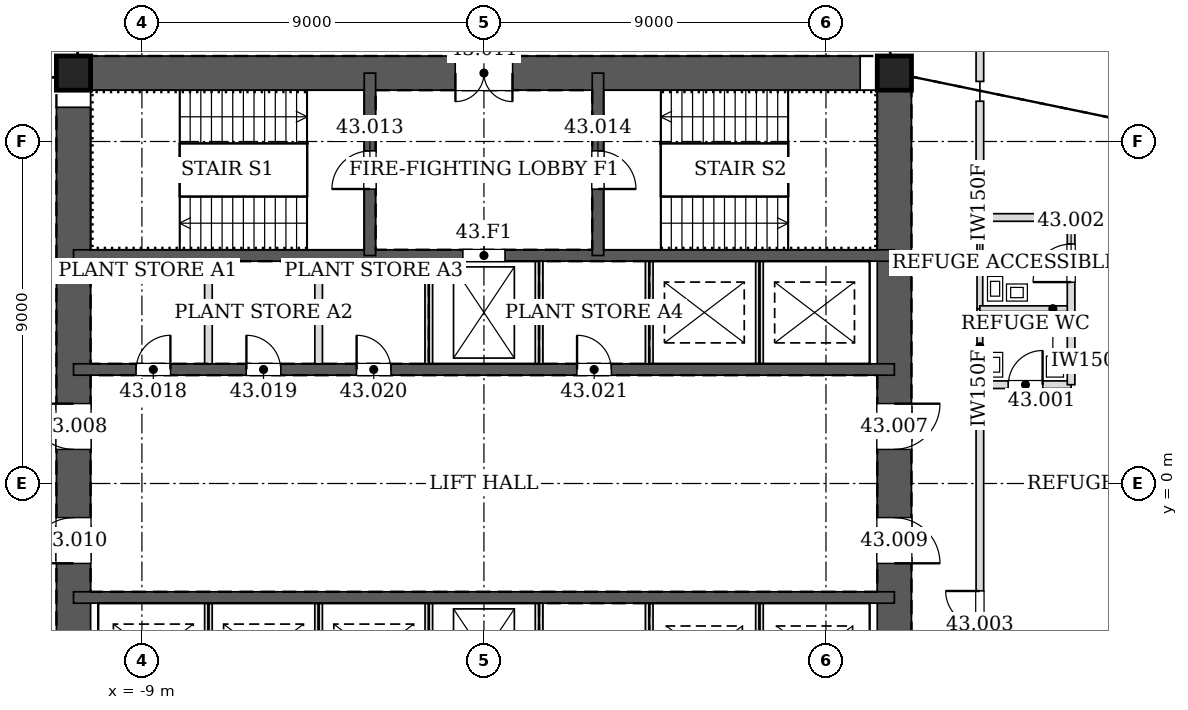
"""IFC4 building model, lengths in metres.
Left out: names, types, materials, properties, quantities, classifications, styles, units other than length and angle.
Written with IfcOpenShell. Run it as: python <this file> out.ifc"""

import sys

from ifc_helpers import new_model, si_unit, direction, frame, frame_2d, origin, origin_2d, place, context, subcontext, project, spatial, rectangle, hollow_rectangle, extrude, element, fill, save


model = new_model("IFC4")
c1 = context("Model", 3, precision=1e-05, world=origin(), true_north=direction((0.0, 1.0)))
c2 = subcontext(c1, "Body", "Model", "MODEL_VIEW")
j1 = project(units=[si_unit("LENGTHUNIT", "METRE"), si_unit("PLANEANGLEUNIT", "RADIAN")], contexts=[c1])
p1 = place(None, origin())
s1 = spatial("IfcSite", under=j1, at=p1, CompositionType="ELEMENT")
p2 = place(p1, origin())
s2 = spatial("IfcBuilding", under=s1, at=p2, CompositionType="ELEMENT")
p3 = place(p2, frame((0.0, 0.0, 189.0)))
s3 = spatial("IfcBuildingStorey", under=s2, at=p3, CompositionType="ELEMENT", Elevation=189.0)
for number, where, z_axis, x_axis in (
    (1, (10.8, 10.8, 0.0), (0.0, 0.0, 1.0), (1.0, 0.0, 0.0)),
    (2, (-10.8, 10.8, 0.0), (0.0, 0.0, 1.0), (1.0, 0.0, 0.0)),
):
    element("IfcColumn", number, at=place(p3, frame(where, z_axis=z_axis, x_axis=x_axis)), inside=s3, PredefinedType="COLUMN", context=c2, shape_type="SweptSolid", body=[
        extrude(hollow_rectangle(XDim=0.9, YDim=0.9, WallThickness=0.06, at=origin_2d()), origin(), (0.0, 0.0, 1.0), 4.5),
    ])
p4 = place(p3, frame((10.8, -10.8, 0.0), z_axis=(0.0, 0.0, 1.0), x_axis=(0.0, 1.0, 0.0)))
e3 = element("IfcWall", 3, at=p4, inside=s3, PredefinedType="SOLIDWALL", context=c2, shape_type="SweptSolid", body=[
    extrude(rectangle(XDim=21.6, YDim=0.9, at=frame_2d((10.8, 0.0))), origin(), (0.0, 0.0, 1.0), 4.5),
])
p5 = place(p4, frame((11.7, 0.0, 0.0)))
e4 = element("IfcOpeningElement", 4, at=p5, cuts=e3, PredefinedType="OPENING", context=c2, shape_type="SweptSolid", body=[
    extrude(rectangle(XDim=1.2, YDim=2.1, at=frame_2d((0.6, 1.05))), frame((0.0, 0.46, 0.0), z_axis=(0.0, -1.0, 0.0), x_axis=(1.0, 0.0, 0.0)), (0.0, 0.0, 1.0), 0.92),
])
p6 = place(p4, frame((8.7, 0.0, 0.0)))
e5 = element("IfcOpeningElement", 5, at=p6, cuts=e3, PredefinedType="OPENING", context=c2, shape_type="SweptSolid", body=[
    extrude(rectangle(XDim=1.2, YDim=2.1, at=frame_2d((0.6, 1.05))), frame((0.0, 0.46, 0.0), z_axis=(0.0, -1.0, 0.0), x_axis=(1.0, 0.0, 0.0)), (0.0, 0.0, 1.0), 0.92),
])
p7 = place(p3, frame((10.8, 10.8, 0.0), z_axis=(0.0, 0.0, 1.0), x_axis=(-1.0, 0.0, 0.0)))
e6 = element("IfcWall", 6, at=p7, inside=s3, PredefinedType="SOLIDWALL", context=c2, shape_type="SweptSolid", body=[
    extrude(rectangle(XDim=21.6, YDim=0.9, at=frame_2d((10.8, 0.0))), origin(), (0.0, 0.0, 1.0), 4.5),
])
p8 = place(p7, frame((10.05, 0.0, 0.0)))
e7 = element("IfcOpeningElement", 7, at=p8, cuts=e6, PredefinedType="OPENING", context=c2, shape_type="SweptSolid", body=[
    extrude(rectangle(XDim=1.5, YDim=2.1, at=frame_2d((0.75, 1.05))), frame((0.0, 0.46, 0.0), z_axis=(0.0, -1.0, 0.0), x_axis=(1.0, 0.0, 0.0)), (0.0, 0.0, 1.0), 0.92),
])
p9 = place(p3, frame((-10.8, 10.8, 0.0), z_axis=(0.0, 0.0, 1.0), x_axis=(0.0, -1.0, 0.0)))
e8 = element("IfcWall", 8, at=p9, inside=s3, PredefinedType="SOLIDWALL", context=c2, shape_type="SweptSolid", body=[
    extrude(rectangle(XDim=21.6, YDim=0.9, at=frame_2d((10.8, 0.0))), origin(), (0.0, 0.0, 1.0), 4.5),
])
p10 = place(p9, frame((8.7, 0.0, 0.0)))
e9 = element("IfcOpeningElement", 9, at=p10, cuts=e8, PredefinedType="OPENING", context=c2, shape_type="SweptSolid", body=[
    extrude(rectangle(XDim=1.2, YDim=2.1, at=frame_2d((0.6, 1.05))), frame((0.0, 0.46, 0.0), z_axis=(0.0, -1.0, 0.0), x_axis=(1.0, 0.0, 0.0)), (0.0, 0.0, 1.0), 0.92),
])
p11 = place(p9, frame((11.7, 0.0, 0.0)))
e10 = element("IfcOpeningElement", 10, at=p11, cuts=e8, PredefinedType="OPENING", context=c2, shape_type="SweptSolid", body=[
    extrude(rectangle(XDim=1.2, YDim=2.1, at=frame_2d((0.6, 1.05))), frame((0.0, 0.46, 0.0), z_axis=(0.0, -1.0, 0.0), x_axis=(1.0, 0.0, 0.0)), (0.0, 0.0, 1.0), 0.92),
])
p12 = place(p3, frame((-10.8, 3.0, 0.0), z_axis=(0.0, 0.0, 1.0), x_axis=(1.0, 0.0, 0.0)))
e11 = element("IfcWall", 11, at=p12, inside=s3, PredefinedType="SOLIDWALL", context=c2, shape_type="SweptSolid", body=[
    extrude(rectangle(XDim=21.6, YDim=0.3, at=frame_2d((10.8, 0.0))), origin(), (0.0, 0.0, 1.0), 4.5),
])
p13 = place(p12, frame((1.65, 0.0, 0.0)))
e12 = element("IfcOpeningElement", 12, at=p13, cuts=e11, PredefinedType="OPENING", context=c2, shape_type="SweptSolid", body=[
    extrude(rectangle(XDim=0.9, YDim=2.1, at=frame_2d((0.45, 1.05))), frame((0.0, 0.16, 0.0), z_axis=(0.0, -1.0, 0.0), x_axis=(1.0, 0.0, 0.0)), (0.0, 0.0, 1.0), 0.32),
])
p14 = place(p12, frame((4.55, 0.0, 0.0)))
e13 = element("IfcOpeningElement", 13, at=p14, cuts=e11, PredefinedType="OPENING", context=c2, shape_type="SweptSolid", body=[
    extrude(rectangle(XDim=0.9, YDim=2.1, at=frame_2d((0.45, 1.05))), frame((0.0, 0.16, 0.0), z_axis=(0.0, -1.0, 0.0), x_axis=(1.0, 0.0, 0.0)), (0.0, 0.0, 1.0), 0.32),
])
p15 = place(p12, frame((7.45, 0.0, 0.0)))
e14 = element("IfcOpeningElement", 14, at=p15, cuts=e11, PredefinedType="OPENING", context=c2, shape_type="SweptSolid", body=[
    extrude(rectangle(XDim=0.9, YDim=2.1, at=frame_2d((0.45, 1.05))), frame((0.0, 0.16, 0.0), z_axis=(0.0, -1.0, 0.0), x_axis=(1.0, 0.0, 0.0)), (0.0, 0.0, 1.0), 0.32),
])
p16 = place(p12, frame((13.25, 0.0, 0.0)))
e15 = element("IfcOpeningElement", 15, at=p16, cuts=e11, PredefinedType="OPENING", context=c2, shape_type="SweptSolid", body=[
    extrude(rectangle(XDim=0.9, YDim=2.1, at=frame_2d((0.45, 1.05))), frame((0.0, 0.16, 0.0), z_axis=(0.0, -1.0, 0.0), x_axis=(1.0, 0.0, 0.0)), (0.0, 0.0, 1.0), 0.32),
])
p17 = place(p3, frame((-10.8, 6.0, 0.0), z_axis=(0.0, 0.0, 1.0), x_axis=(1.0, 0.0, 0.0)))
e16 = element("IfcWall", 16, at=p17, inside=s3, PredefinedType="SOLIDWALL", context=c2, shape_type="SweptSolid", body=[
    extrude(rectangle(XDim=21.6, YDim=0.3, at=frame_2d((10.8, 0.0))), origin(), (0.0, 0.0, 1.0), 4.5),
])
p18 = place(p17, frame((10.25, 0.0, 0.0)))
e17 = element("IfcOpeningElement", 17, at=p18, cuts=e16, PredefinedType="OPENING", context=c2, shape_type="SweptSolid", body=[
    extrude(rectangle(XDim=1.1, YDim=2.1, at=frame_2d((0.55, 1.05))), frame((0.0, 0.16, 0.0), z_axis=(0.0, -1.0, 0.0), x_axis=(1.0, 0.0, 0.0)), (0.0, 0.0, 1.0), 0.32),
])
p19 = place(p3, frame((-3.0, 6.0, 0.0), z_axis=(0.0, 0.0, 1.0), x_axis=(0.0, 1.0, 0.0)))
e18 = element("IfcWall", 18, at=p19, inside=s3, PredefinedType="SOLIDWALL", context=c2, shape_type="SweptSolid", body=[
    extrude(rectangle(XDim=4.8, YDim=0.3, at=frame_2d((2.4, 0.0))), origin(), (0.0, 0.0, 1.0), 4.5),
])
p20 = place(p19, frame((1.75, 0.0, 0.0)))
e19 = element("IfcOpeningElement", 19, at=p20, cuts=e18, PredefinedType="OPENING", context=c2, shape_type="SweptSolid", body=[
    extrude(rectangle(XDim=1.0, YDim=2.1, at=frame_2d((0.5, 1.05))), frame((0.0, 0.16, 0.0), z_axis=(0.0, -1.0, 0.0), x_axis=(1.0, 0.0, 0.0)), (0.0, 0.0, 1.0), 0.32),
])
p21 = place(p3, frame((3.0, 6.0, 0.0), z_axis=(0.0, 0.0, 1.0), x_axis=(0.0, 1.0, 0.0)))
e20 = element("IfcWall", 20, at=p21, inside=s3, PredefinedType="SOLIDWALL", context=c2, shape_type="SweptSolid", body=[
    extrude(rectangle(XDim=4.8, YDim=0.3, at=frame_2d((2.4, 0.0))), origin(), (0.0, 0.0, 1.0), 4.5),
])
p22 = place(p21, frame((1.75, 0.0, 0.0)))
e21 = element("IfcOpeningElement", 21, at=p22, cuts=e20, PredefinedType="OPENING", context=c2, shape_type="SweptSolid", body=[
    extrude(rectangle(XDim=1.0, YDim=2.1, at=frame_2d((0.5, 1.05))), frame((0.0, 0.16, 0.0), z_axis=(0.0, -1.0, 0.0), x_axis=(1.0, 0.0, 0.0)), (0.0, 0.0, 1.0), 0.32),
])
p23 = place(p3, frame((-10.8, -3.0, 0.0), z_axis=(0.0, 0.0, 1.0), x_axis=(1.0, 0.0, 0.0)))
e22 = element("IfcWall", 22, at=p23, inside=s3, PredefinedType="SOLIDWALL", context=c2, shape_type="SweptSolid", body=[
    extrude(rectangle(XDim=21.6, YDim=0.3, at=frame_2d((10.8, 0.0))), origin(), (0.0, 0.0, 1.0), 4.5),
])
p24 = place(p3, frame((13.05, 2.599, 0.0), z_axis=(0.0, 0.0, 1.0), x_axis=(0.0, 1.0, 0.0)))
e23 = element("IfcWall", 23, at=p24, inside=s3, PredefinedType="PARTITIONING", context=c2, shape_type="SweptSolid", body=[
    extrude(rectangle(XDim=2.002, YDim=0.15, at=frame_2d((1.001, 0.0))), origin(), (0.0, 0.0, 1.0), 3.394),
])
p25 = place(p3, frame((13.05, 4.599, 0.0), z_axis=(0.0, 0.0, 1.0), x_axis=(0.0, 1.0, 0.0)))
e24 = element("IfcWall", 24, at=p25, inside=s3, PredefinedType="PARTITIONING", context=c2, shape_type="SweptSolid", body=[
    extrude(rectangle(XDim=2.402, YDim=0.15, at=frame_2d((1.201, 0.0))), origin(), (0.0, 0.0, 1.0), 3.394),
])
p26 = place(p3, frame((13.05, -10.579, 0.0), z_axis=(0.0, 0.0, 1.0), x_axis=(0.0, 1.0, 0.0)))
e25 = element("IfcWall", 25, at=p26, inside=s3, PredefinedType="PARTITIONING", context=c2, shape_type="SweptSolid", body=[
    extrude(rectangle(XDim=13.18, YDim=0.2, at=frame_2d((6.59, 0.0))), origin(), (0.0, 0.0, 1.0), 2.94),
])
p27 = place(p26, frame((5.95, 0.0, 0.0)))
e26 = element("IfcOpeningElement", 26, at=p27, cuts=e25, PredefinedType="OPENING", context=c2, shape_type="SweptSolid", body=[
    extrude(rectangle(XDim=1.8, YDim=2.4, at=frame_2d((0.9, 1.2))), frame((0.0, 0.11, 0.0), z_axis=(0.0, -1.0, 0.0), x_axis=(1.0, 0.0, 0.0)), (0.0, 0.0, 1.0), 0.22),
])
p28 = place(p3, frame((13.05, 6.999, 0.0), z_axis=(0.0, 0.0, 1.0), x_axis=(0.0, 1.0, 0.0)))
e27 = element("IfcWall", 27, at=p28, inside=s3, PredefinedType="PARTITIONING", context=c2, shape_type="SweptSolid", body=[
    extrude(rectangle(XDim=3.06, YDim=0.2, at=frame_2d((1.53, 0.0))), origin(), (0.0, 0.0, 1.0), 3.394),
])
p29 = place(p3, frame((13.05, 10.581, 0.0), z_axis=(0.0, 0.0, 1.0), x_axis=(0.0, 1.0, 0.0)))
e28 = element("IfcWall", 28, at=p29, inside=s3, PredefinedType="PARTITIONING", context=c2, shape_type="SweptSolid", body=[
    extrude(rectangle(XDim=2.469, YDim=0.2, at=frame_2d((1.235, 0.0))), origin(), (0.0, 0.0, 1.0), 3.313),
])
p30 = place(p3, frame((15.45, 4.6, 0.0), z_axis=(0.0, 0.0, 1.0), x_axis=(-1.0, 0.0, 0.0)))
e29 = element("IfcWall", 29, at=p30, inside=s3, PredefinedType="PARTITIONING", context=c2, shape_type="SweptSolid", body=[
    extrude(rectangle(XDim=2.4, YDim=0.15, at=frame_2d((1.2, 0.0))), origin(), (0.0, 0.0, 1.0), 3.394),
])
p31 = place(p3, frame((13.05, 2.6, 0.0), z_axis=(0.0, 0.0, 1.0), x_axis=(1.0, 0.0, 0.0)))
e30 = element("IfcWall", 30, at=p31, inside=s3, PredefinedType="PARTITIONING", context=c2, shape_type="SweptSolid", body=[
    extrude(rectangle(XDim=2.4, YDim=0.2, at=frame_2d((1.2, 0.0))), origin(), (0.0, 0.0, 1.0), 3.394),
])
p32 = place(p31, frame((0.75, 0.0, 0.0)))
e31 = element("IfcOpeningElement", 31, at=p32, cuts=e30, PredefinedType="OPENING", context=c2, shape_type="SweptSolid", body=[
    extrude(rectangle(XDim=0.9, YDim=2.1, at=frame_2d((0.45, 1.05))), frame((0.0, 0.11, 0.0), z_axis=(0.0, -1.0, 0.0), x_axis=(1.0, 0.0, 0.0)), (0.0, 0.0, 1.0), 0.22),
])
p33 = place(p3, frame((15.45, 2.6, 0.0), z_axis=(0.0, 0.0, 1.0), x_axis=(0.0, 1.0, 0.0)))
e32 = element("IfcWall", 32, at=p33, inside=s3, PredefinedType="PARTITIONING", context=c2, shape_type="SweptSolid", body=[
    extrude(rectangle(XDim=4.4, YDim=0.2, at=frame_2d((2.2, 0.0))), origin(), (0.0, 0.0, 1.0), 4.25),
])
p34 = place(p33, frame((2.7, 0.0, 0.0)))
e33 = element("IfcOpeningElement", 33, at=p34, cuts=e32, PredefinedType="OPENING", context=c2, shape_type="SweptSolid", body=[
    extrude(rectangle(XDim=1.0, YDim=2.1, at=frame_2d((0.5, 1.05))), frame((0.0, 0.11, 0.0), z_axis=(0.0, -1.0, 0.0), x_axis=(1.0, 0.0, 0.0)), (0.0, 0.0, 1.0), 0.22),
])
p35 = place(p3, frame((15.45, 7.0, 0.0), z_axis=(0.0, 0.0, 1.0), x_axis=(-1.0, 0.0, 0.0)))
e34 = element("IfcWall", 34, at=p35, inside=s3, PredefinedType="PARTITIONING", context=c2, shape_type="SweptSolid", body=[
    extrude(rectangle(XDim=2.4, YDim=0.2, at=frame_2d((1.2, 0.0))), origin(), (0.0, 0.0, 1.0), 3.394),
])
for number, where, z_axis, x_axis in (
    (35, (-7.25, 3.15, 0.0), (0.0, 0.0, 1.0), (0.0, 1.0, 0.0)),
    (36, (-4.35, 3.15, 0.0), (0.0, 0.0, 1.0), (0.0, 1.0, 0.0)),
    (37, (-1.45, 3.15, 0.0), (0.0, 0.0, 1.0), (0.0, 1.0, 0.0)),
    (38, (1.45, 3.15, 0.0), (0.0, 0.0, 1.0), (0.0, 1.0, 0.0)),
    (39, (4.35, 3.15, 0.0), (0.0, 0.0, 1.0), (0.0, 1.0, 0.0)),
):
    element("IfcWall", number, at=place(p3, frame(where, z_axis=z_axis, x_axis=x_axis)), inside=s3, PredefinedType="PARTITIONING", context=c2, shape_type="SweptSolid", body=[
        extrude(rectangle(XDim=2.7, YDim=0.2, at=frame_2d((1.35, 0.0))), origin(), (0.0, 0.0, 1.0), 4.25),
    ])
for number, where, z_axis, x_axis in (
    (40, (7.25, 3.15, 0.0), (0.0, 0.0, 1.0), (0.0, 1.0, 0.0)),
    (41, (-7.25, -5.85, 0.0), (0.0, 0.0, 1.0), (0.0, 1.0, 0.0)),
    (42, (-4.35, -5.85, 0.0), (0.0, 0.0, 1.0), (0.0, 1.0, 0.0)),
    (43, (-1.45, -5.85, 0.0), (0.0, 0.0, 1.0), (0.0, 1.0, 0.0)),
):
    element("IfcWall", number, at=place(p3, frame(where, z_axis=z_axis, x_axis=x_axis)), inside=s3, PredefinedType="PARTITIONING", context=c2, shape_type="SweptSolid", body=[
        extrude(rectangle(XDim=2.7, YDim=0.2, at=frame_2d((1.35, 0.0))), origin(), (0.0, 0.0, 1.0), 4.5),
    ])
for number, where, z_axis, x_axis in (
    (44, (1.45, -5.85, 0.0), (0.0, 0.0, 1.0), (0.0, 1.0, 0.0)),
    (45, (4.35, -5.85, 0.0), (0.0, 0.0, 1.0), (0.0, 1.0, 0.0)),
):
    element("IfcWall", number, at=place(p3, frame(where, z_axis=z_axis, x_axis=x_axis)), inside=s3, PredefinedType="PARTITIONING", context=c2, shape_type="SweptSolid", body=[
        extrude(rectangle(XDim=2.7, YDim=0.2, at=frame_2d((1.35, 0.0))), origin(), (0.0, 0.0, 1.0), 4.25),
    ])
p36 = place(p3, frame((7.25, -5.85, 0.0), z_axis=(0.0, 0.0, 1.0), x_axis=(0.0, 1.0, 0.0)))
e46 = element("IfcWall", 46, at=p36, inside=s3, PredefinedType="PARTITIONING", context=c2, shape_type="SweptSolid", body=[
    extrude(rectangle(XDim=2.7, YDim=0.2, at=frame_2d((1.35, 0.0))), origin(), (0.0, 0.0, 1.0), 4.5),
])
p37 = place(p32, origin())
e47 = element("IfcDoor", 47, at=p37, inside=s3, OperationType="SINGLE_SWING_RIGHT", PredefinedType="DOOR", context=c2, shape_type="SweptSolid", body=[
    extrude(rectangle(XDim=0.9, YDim=2.1, at=frame_2d((0.45, 1.05))), frame((0.0, 0.025, 0.0), z_axis=(0.0, -1.0, 0.0), x_axis=(1.0, 0.0, 0.0)), (0.0, 0.0, 1.0), 0.05),
])
fill(e31, e47)
p38 = place(p34, origin())
e48 = element("IfcDoor", 48, at=p38, inside=s3, OperationType="SINGLE_SWING_LEFT", PredefinedType="DOOR", context=c2, shape_type="SweptSolid", body=[
    extrude(rectangle(XDim=1.0, YDim=2.1, at=frame_2d((0.5, 1.05))), frame((0.0, 0.025, 0.0), z_axis=(0.0, -1.0, 0.0), x_axis=(1.0, 0.0, 0.0)), (0.0, 0.0, 1.0), 0.05),
])
fill(e33, e48)
p39 = place(p27, origin())
e49 = element("IfcDoor", 49, at=p39, inside=s3, OperationType="DOUBLE_DOOR_SINGLE_SWING", PredefinedType="DOOR", context=c2, shape_type="SweptSolid", body=[
    extrude(rectangle(XDim=1.8, YDim=2.4, at=frame_2d((0.9, 1.2))), frame((0.0, 0.025, 0.0), z_axis=(0.0, -1.0, 0.0), x_axis=(1.0, 0.0, 0.0)), (0.0, 0.0, 1.0), 0.05),
])
fill(e26, e49)
p40 = place(p5, frame((1.2, 0.0, 0.0), z_axis=(0.0, 0.0, 1.0), x_axis=(-1.0, 0.0, 0.0)))
e50 = element("IfcDoor", 50, at=p40, inside=s3, OperationType="SINGLE_SWING_LEFT", PredefinedType="DOOR", context=c2, shape_type="SweptSolid", body=[
    extrude(rectangle(XDim=1.2, YDim=2.1, at=frame_2d((0.6, 1.05))), frame((0.0, 0.025, 0.0), z_axis=(0.0, -1.0, 0.0), x_axis=(1.0, 0.0, 0.0)), (0.0, 0.0, 1.0), 0.05),
])
fill(e4, e50)
p41 = place(p10, frame((1.2, 0.0, 0.0), z_axis=(0.0, 0.0, 1.0), x_axis=(-1.0, 0.0, 0.0)))
e51 = element("IfcDoor", 51, at=p41, inside=s3, OperationType="SINGLE_SWING_RIGHT", PredefinedType="DOOR", context=c2, shape_type="SweptSolid", body=[
    extrude(rectangle(XDim=1.2, YDim=2.1, at=frame_2d((0.6, 1.05))), frame((0.0, 0.025, 0.0), z_axis=(0.0, -1.0, 0.0), x_axis=(1.0, 0.0, 0.0)), (0.0, 0.0, 1.0), 0.05),
])
fill(e9, e51)
p42 = place(p6, frame((1.2, 0.0, 0.0), z_axis=(0.0, 0.0, 1.0), x_axis=(-1.0, 0.0, 0.0)))
e52 = element("IfcDoor", 52, at=p42, inside=s3, OperationType="SINGLE_SWING_RIGHT", PredefinedType="DOOR", context=c2, shape_type="SweptSolid", body=[
    extrude(rectangle(XDim=1.2, YDim=2.1, at=frame_2d((0.6, 1.05))), frame((0.0, 0.025, 0.0), z_axis=(0.0, -1.0, 0.0), x_axis=(1.0, 0.0, 0.0)), (0.0, 0.0, 1.0), 0.05),
])
fill(e5, e52)
p43 = place(p11, frame((1.2, 0.0, 0.0), z_axis=(0.0, 0.0, 1.0), x_axis=(-1.0, 0.0, 0.0)))
e53 = element("IfcDoor", 53, at=p43, inside=s3, OperationType="SINGLE_SWING_LEFT", PredefinedType="DOOR", context=c2, shape_type="SweptSolid", body=[
    extrude(rectangle(XDim=1.2, YDim=2.1, at=frame_2d((0.6, 1.05))), frame((0.0, 0.025, 0.0), z_axis=(0.0, -1.0, 0.0), x_axis=(1.0, 0.0, 0.0)), (0.0, 0.0, 1.0), 0.05),
])
fill(e10, e53)
p44 = place(p8, origin())
e54 = element("IfcDoor", 54, at=p44, inside=s3, OperationType="DOUBLE_DOOR_SINGLE_SWING", PredefinedType="DOOR", context=c2, shape_type="SweptSolid", body=[
    extrude(rectangle(XDim=1.5, YDim=2.1, at=frame_2d((0.75, 1.05))), frame((0.0, 0.025, 0.0), z_axis=(0.0, -1.0, 0.0), x_axis=(1.0, 0.0, 0.0)), (0.0, 0.0, 1.0), 0.05),
])
fill(e7, e54)
p45 = place(p20, origin())
e55 = element("IfcDoor", 55, at=p45, inside=s3, OperationType="SINGLE_SWING_LEFT", PredefinedType="DOOR", context=c2, shape_type="SweptSolid", body=[
    extrude(rectangle(XDim=1.0, YDim=2.1, at=frame_2d((0.5, 1.05))), frame((0.0, 0.025, 0.0), z_axis=(0.0, -1.0, 0.0), x_axis=(1.0, 0.0, 0.0)), (0.0, 0.0, 1.0), 0.05),
])
fill(e19, e55)
p46 = place(p22, frame((1.0, 0.0, 0.0), z_axis=(0.0, 0.0, 1.0), x_axis=(-1.0, 0.0, 0.0)))
e56 = element("IfcDoor", 56, at=p46, inside=s3, OperationType="SINGLE_SWING_RIGHT", PredefinedType="DOOR", context=c2, shape_type="SweptSolid", body=[
    extrude(rectangle(XDim=1.0, YDim=2.1, at=frame_2d((0.5, 1.05))), frame((0.0, 0.025, 0.0), z_axis=(0.0, -1.0, 0.0), x_axis=(1.0, 0.0, 0.0)), (0.0, 0.0, 1.0), 0.05),
])
fill(e21, e56)
p47 = place(p13, origin())
e57 = element("IfcDoor", 57, at=p47, inside=s3, OperationType="SINGLE_SWING_RIGHT", PredefinedType="DOOR", context=c2, shape_type="SweptSolid", body=[
    extrude(rectangle(XDim=0.9, YDim=2.1, at=frame_2d((0.45, 1.05))), frame((0.0, 0.025, 0.0), z_axis=(0.0, -1.0, 0.0), x_axis=(1.0, 0.0, 0.0)), (0.0, 0.0, 1.0), 0.05),
])
fill(e12, e57)
p48 = place(p14, origin())
e58 = element("IfcDoor", 58, at=p48, inside=s3, OperationType="SINGLE_SWING_LEFT", PredefinedType="DOOR", context=c2, shape_type="SweptSolid", body=[
    extrude(rectangle(XDim=0.9, YDim=2.1, at=frame_2d((0.45, 1.05))), frame((0.0, 0.025, 0.0), z_axis=(0.0, -1.0, 0.0), x_axis=(1.0, 0.0, 0.0)), (0.0, 0.0, 1.0), 0.05),
])
fill(e13, e58)
p49 = place(p15, origin())
e59 = element("IfcDoor", 59, at=p49, inside=s3, OperationType="SINGLE_SWING_LEFT", PredefinedType="DOOR", context=c2, shape_type="SweptSolid", body=[
    extrude(rectangle(XDim=0.9, YDim=2.1, at=frame_2d((0.45, 1.05))), frame((0.0, 0.025, 0.0), z_axis=(0.0, -1.0, 0.0), x_axis=(1.0, 0.0, 0.0)), (0.0, 0.0, 1.0), 0.05),
])
fill(e14, e59)
p50 = place(p16, origin())
e60 = element("IfcDoor", 60, at=p50, inside=s3, OperationType="SINGLE_SWING_LEFT", PredefinedType="DOOR", context=c2, shape_type="SweptSolid", body=[
    extrude(rectangle(XDim=0.9, YDim=2.1, at=frame_2d((0.45, 1.05))), frame((0.0, 0.025, 0.0), z_axis=(0.0, -1.0, 0.0), x_axis=(1.0, 0.0, 0.0)), (0.0, 0.0, 1.0), 0.05),
])
fill(e15, e60)
p51 = place(p18, origin())
e61 = element("IfcDoor", 61, at=p51, inside=s3, OperationType="DOUBLE_DOOR_SLIDING", PredefinedType="DOOR", context=c2, shape_type="SweptSolid", body=[
    extrude(rectangle(XDim=1.1, YDim=2.1, at=frame_2d((0.55, 1.05))), frame((0.0, 0.025, 0.0), z_axis=(0.0, -1.0, 0.0), x_axis=(1.0, 0.0, 0.0)), (0.0, 0.0, 1.0), 0.05),
])
fill(e17, e61)
save(model, sys.argv[1])
